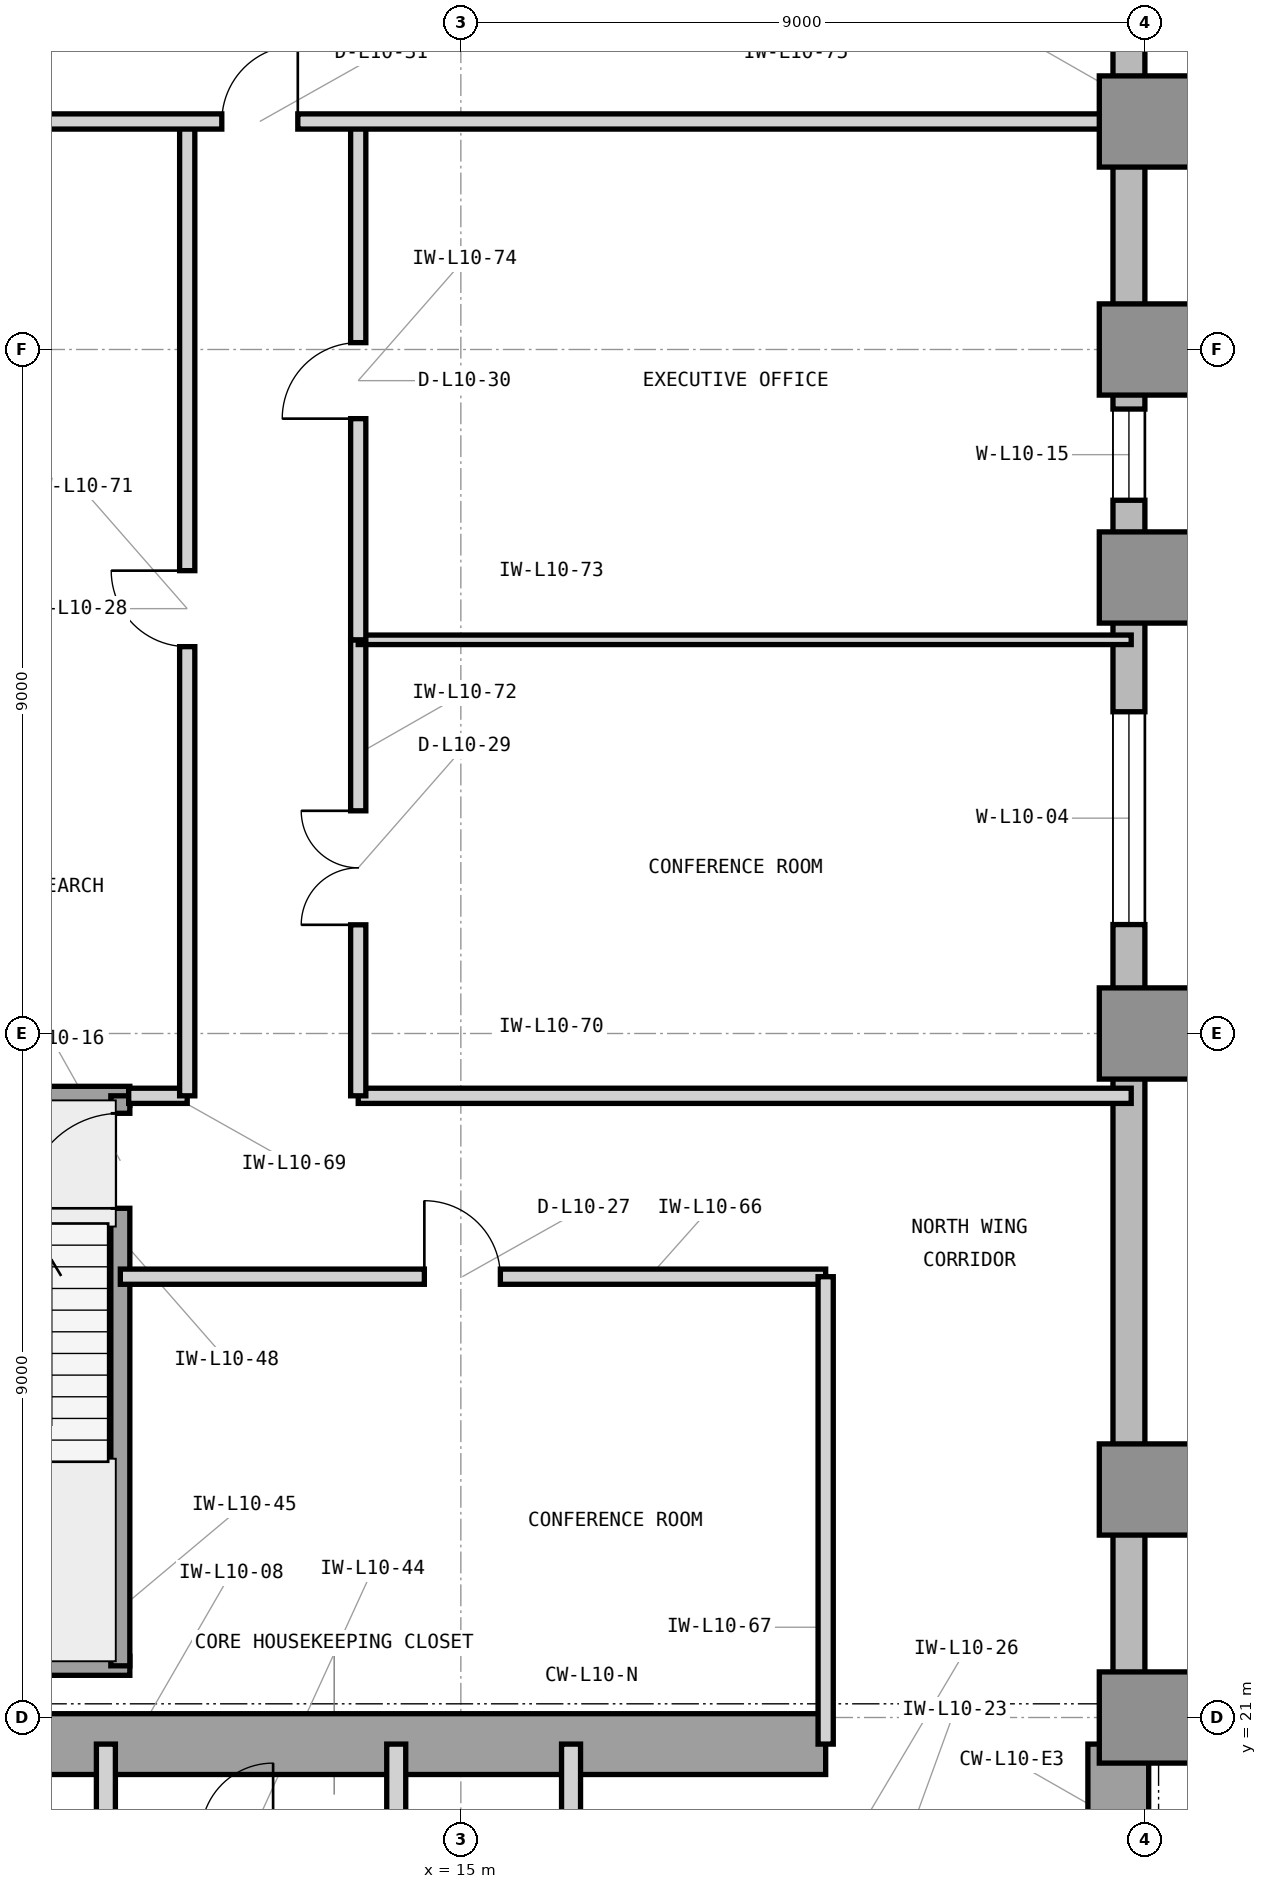
"""IFC4 building model, lengths in metres.
Left out: names, types, materials, properties, quantities, classifications, styles, units other than length and angle.
Written with IfcOpenShell. Run it as: python <this file> out.ifc"""

import sys

from ifc_helpers import new_model, si_unit, direction, frame, frame_2d, origin, origin_2d, place, context, subcontext, project, spatial, rectangle, extrude, element, fill, save


model = new_model("IFC4")
c1 = context("Model", 3, precision=1e-05, world=origin(), true_north=direction((0.0, 1.0)))
c2 = subcontext(c1, "Body", "Model", "MODEL_VIEW")
j1 = project(units=[si_unit("LENGTHUNIT", "METRE"), si_unit("PLANEANGLEUNIT", "RADIAN")], contexts=[c1])
p1 = place(None, origin())
s1 = spatial("IfcSite", under=j1, at=p1, CompositionType="ELEMENT")
p2 = place(p1, origin())
s2 = spatial("IfcBuilding", under=s1, at=p2, CompositionType="ELEMENT")
p3 = place(p2, frame((0.0, 0.0, 46.8)))
s3 = spatial("IfcBuildingStorey", under=s2, at=p3, CompositionType="ELEMENT", Elevation=46.8)
p4 = place(p3, frame((7.475, 20.65, 0.0), z_axis=(0.0, 0.0, 1.0), x_axis=(1.0, 0.0, 0.0)))
e1 = element("IfcWall", 1, at=p4, inside=s3, PredefinedType="SHEAR", context=c2, shape_type="SweptSolid", body=[
    extrude(rectangle(XDim=12.325, YDim=0.8, at=frame_2d((6.163, 0.0))), origin(), (0.0, 0.0, 1.0), 4.2),
])
p5 = place(p3, frame((23.65, 16.6, 0.0), z_axis=(0.0, 0.0, 1.0), x_axis=(0.0, 1.0, 0.0)))
e2 = element("IfcWall", 2, at=p5, inside=s3, PredefinedType="SHEAR", context=c2, shape_type="SweptSolid", body=[
    extrude(rectangle(XDim=4.05, YDim=0.8, at=frame_2d((2.025, 0.0))), origin(), (0.0, 0.0, 1.0), 4.2),
])
for number, where, z_axis, x_axis in (
    (3, (24.0, 21.0, 0.0), (0.0, 0.0, 1.0), (1.0, 0.0, 0.0)),
    (4, (24.0, 24.0, 0.0), (0.0, 0.0, 1.0), (1.0, 0.0, 0.0)),
    (5, (24.0, 30.0, 0.0), (0.0, 0.0, 1.0), (1.0, 0.0, 0.0)),
    (6, (24.0, 36.0, 0.0), (0.0, 0.0, 1.0), (1.0, 0.0, 0.0)),
    (7, (24.0, 39.0, 0.0), (0.0, 0.0, 1.0), (1.0, 0.0, 0.0)),
    (8, (24.0, 42.0, 0.0), (0.0, 0.0, 1.0), (1.0, 0.0, 0.0)),
):
    element("IfcColumn", number, at=place(p3, frame(where, z_axis=z_axis, x_axis=x_axis)), inside=s3, PredefinedType="COLUMN", context=c2, shape_type="SweptSolid", body=[
        extrude(rectangle(XDim=1.2, YDim=1.2, at=origin_2d()), origin(), (0.0, 0.0, 1.0), 4.2),
    ])
p6 = place(p3, frame((64.4, 20.79, 0.0), z_axis=(0.0, 0.0, 1.0), x_axis=(-1.0, 0.0, 0.0)))
e9 = element("IfcWall", 9, at=p6, inside=s3, PredefinedType="STANDARD", context=c2, shape_type="SweptSolid", body=[
    extrude(rectangle(XDim=40.4, YDim=0.42, at=frame_2d((20.2, 0.0))), origin(), (0.0, 0.0, 1.0), 3.98),
])
p7 = place(p6, frame((26.375, 0.0, 0.85)))
e10 = element("IfcOpeningElement", 10, at=p7, cuts=e9, PredefinedType="OPENING", context=c2, shape_type="SweptSolid", body=[
    extrude(rectangle(XDim=2.8, YDim=2.45, at=frame_2d((1.4, 1.225))), frame((0.0, 0.22, 0.0), z_axis=(0.0, -1.0, 0.0), x_axis=(1.0, 0.0, 0.0)), (0.0, 0.0, 1.0), 0.44),
])
p8 = place(p6, frame((38.222, 0.0, 0.85)))
e11 = element("IfcOpeningElement", 11, at=p8, cuts=e9, PredefinedType="OPENING", context=c2, shape_type="SweptSolid", body=[
    extrude(rectangle(XDim=1.2, YDim=2.45, at=frame_2d((0.6, 1.225))), frame((0.0, 0.22, 0.0), z_axis=(0.0, -1.0, 0.0), x_axis=(1.0, 0.0, 0.0)), (0.0, 0.0, 1.0), 0.44),
])
p9 = place(p6, frame((32.536, 0.0, 0.85)))
e12 = element("IfcOpeningElement", 12, at=p9, cuts=e9, PredefinedType="OPENING", context=c2, shape_type="SweptSolid", body=[
    extrude(rectangle(XDim=2.8, YDim=2.45, at=frame_2d((1.4, 1.225))), frame((0.0, 0.22, 0.0), z_axis=(0.0, -1.0, 0.0), x_axis=(1.0, 0.0, 0.0)), (0.0, 0.0, 1.0), 0.44),
])
p10 = place(p6, frame((17.386, 0.0, 0.85)))
e13 = element("IfcOpeningElement", 13, at=p10, cuts=e9, PredefinedType="OPENING", context=c2, shape_type="SweptSolid", body=[
    extrude(rectangle(XDim=2.8, YDim=2.45, at=frame_2d((1.4, 1.225))), frame((0.0, 0.22, 0.0), z_axis=(0.0, -1.0, 0.0), x_axis=(1.0, 0.0, 0.0)), (0.0, 0.0, 1.0), 0.44),
])
p11 = place(p3, frame((23.79, 21.0, 0.0), z_axis=(0.0, 0.0, 1.0), x_axis=(0.0, 1.0, 0.0)))
e14 = element("IfcWall", 14, at=p11, inside=s3, PredefinedType="STANDARD", context=c2, shape_type="SweptSolid", body=[
    extrude(rectangle(XDim=28.4, YDim=0.42, at=frame_2d((14.2, 0.0))), origin(), (0.0, 0.0, 1.0), 3.98),
])
p12 = place(p11, frame((10.433, 0.0, 0.85)))
e15 = element("IfcOpeningElement", 15, at=p12, cuts=e14, PredefinedType="OPENING", context=c2, shape_type="SweptSolid", body=[
    extrude(rectangle(XDim=2.8, YDim=2.45, at=frame_2d((1.4, 1.225))), frame((0.0, 0.22, 0.0), z_axis=(0.0, -1.0, 0.0), x_axis=(1.0, 0.0, 0.0)), (0.0, 0.0, 1.0), 0.44),
])
p13 = place(p11, frame((16.016, 0.0, 0.85)))
e16 = element("IfcOpeningElement", 16, at=p13, cuts=e14, PredefinedType="OPENING", context=c2, shape_type="SweptSolid", body=[
    extrude(rectangle(XDim=1.2, YDim=2.45, at=frame_2d((0.6, 1.225))), frame((0.0, 0.22, 0.0), z_axis=(0.0, -1.0, 0.0), x_axis=(1.0, 0.0, 0.0)), (0.0, 0.0, 1.0), 0.44),
])
p14 = place(p3, frame((10.33, 19.45, 0.0), z_axis=(0.0, 0.0, 1.0), x_axis=(0.0, 1.0, 0.0)))
e17 = element("IfcWall", 17, at=p14, inside=s3, PredefinedType="PARTITIONING", context=c2, shape_type="SweptSolid", body=[
    extrude(rectangle(XDim=1.2, YDim=0.25, at=frame_2d((0.6, 0.0))), origin(), (0.0, 0.0, 1.0), 3.114),
])
for number, where, z_axis, x_axis in (
    (18, (14.15, 16.7, 0.0), (0.0, 0.0, 1.0), (0.0, 1.0, 0.0)),
    (19, (16.45, 16.7, 0.0), (0.0, 0.0, 1.0), (0.0, 1.0, 0.0)),
):
    element("IfcWall", number, at=place(p3, frame(where, z_axis=z_axis, x_axis=x_axis)), inside=s3, PredefinedType="PARTITIONING", context=c2, shape_type="SweptSolid", body=[
        extrude(rectangle(XDim=3.95, YDim=0.25, at=frame_2d((1.975, 0.0))), origin(), (0.0, 0.0, 1.0), 3.97),
    ])
for number, where, z_axis, x_axis in (
    (20, (6.555, 21.68, 0.0), (0.0, 0.0, 1.0), (1.0, 0.0, 0.0)),
    (21, (6.555, 29.18, 0.0), (0.0, 0.0, 1.0), (1.0, 0.0, 0.0)),
):
    element("IfcWall", number, at=place(p3, frame(where, z_axis=z_axis, x_axis=x_axis)), inside=s3, PredefinedType="SHEAR", context=c2, shape_type="SweptSolid", body=[
        extrude(rectangle(XDim=4.09, YDim=0.25, at=frame_2d((2.045, 0.0))), origin(), (0.0, 0.0, 1.0), 4.2),
    ])
p15 = place(p3, frame((10.52, 21.68, 0.0), z_axis=(0.0, 0.0, 1.0), x_axis=(0.0, 1.0, 0.0)))
e22 = element("IfcWall", 22, at=p15, inside=s3, PredefinedType="SHEAR", context=c2, shape_type="SweptSolid", body=[
    extrude(rectangle(XDim=7.5, YDim=0.25, at=frame_2d((3.75, 0.0))), origin(), (0.0, 0.0, 1.0), 4.2),
])
p16 = place(p15, frame((6.02, 0.0, 0.0)))
e23 = element("IfcOpeningElement", 23, at=p16, cuts=e22, PredefinedType="OPENING", context=c2, shape_type="SweptSolid", body=[
    extrude(rectangle(XDim=1.25, YDim=2.2, at=frame_2d((0.625, 1.1))), frame((0.0, 0.135, 0.0), z_axis=(0.0, -1.0, 0.0), x_axis=(1.0, 0.0, 0.0)), (0.0, 0.0, 1.0), 0.27),
])
p17 = place(p3, frame((10.52, 26.8, 0.0), z_axis=(0.0, 0.0, 1.0), x_axis=(1.0, 0.0, 0.0)))
e24 = element("IfcWall", 24, at=p17, inside=s3, PredefinedType="PARTITIONING", context=c2, shape_type="SweptSolid", body=[
    extrude(rectangle(XDim=9.28, YDim=0.2, at=frame_2d((4.64, 0.0))), origin(), (0.0, 0.0, 1.0), 3.97),
])
p18 = place(p17, frame((4.0, 0.0, 0.0)))
e25 = element("IfcOpeningElement", 25, at=p18, cuts=e24, PredefinedType="OPENING", context=c2, shape_type="SweptSolid", body=[
    extrude(rectangle(XDim=1.0, YDim=2.15, at=frame_2d((0.5, 1.075))), frame((0.0, 0.11, 0.0), z_axis=(0.0, -1.0, 0.0), x_axis=(1.0, 0.0, 0.0)), (0.0, 0.0, 1.0), 0.22),
])
p19 = place(p3, frame((19.8, 20.65, 0.0), z_axis=(0.0, 0.0, 1.0), x_axis=(0.0, 1.0, 0.0)))
e26 = element("IfcWall", 26, at=p19, inside=s3, PredefinedType="PARTITIONING", context=c2, shape_type="SweptSolid", body=[
    extrude(rectangle(XDim=6.15, YDim=0.2, at=frame_2d((3.075, 0.0))), origin(), (0.0, 0.0, 1.0), 3.97),
])
p20 = place(p3, frame((10.63, 29.18, 0.0), z_axis=(0.0, 0.0, 1.0), x_axis=(1.0, 0.0, 0.0)))
e27 = element("IfcWall", 27, at=p20, inside=s3, PredefinedType="PARTITIONING", context=c2, shape_type="SweptSolid", body=[
    extrude(rectangle(XDim=0.77, YDim=0.2, at=frame_2d((0.385, 0.0))), origin(), (0.0, 0.0, 1.0), 3.97),
])
p21 = place(p3, frame((13.65, 29.18, 0.0), z_axis=(0.0, 0.0, 1.0), x_axis=(1.0, 0.0, 0.0)))
e28 = element("IfcWall", 28, at=p21, inside=s3, PredefinedType="PARTITIONING", context=c2, shape_type="SweptSolid", body=[
    extrude(rectangle(XDim=10.17, YDim=0.2, at=frame_2d((5.085, 0.0))), origin(), (0.0, 0.0, 1.0), 3.97),
])
p22 = place(p3, frame((11.4, 29.18, 0.0), z_axis=(0.0, 0.0, 1.0), x_axis=(0.0, 1.0, 0.0)))
e29 = element("IfcWall", 29, at=p22, inside=s3, PredefinedType="PARTITIONING", context=c2, shape_type="SweptSolid", body=[
    extrude(rectangle(XDim=12.82, YDim=0.2, at=frame_2d((6.41, 0.0))), origin(), (0.0, 0.0, 1.0), 3.97),
])
p23 = place(p22, frame((5.91, 0.0, 0.0)))
e30 = element("IfcOpeningElement", 30, at=p23, cuts=e29, PredefinedType="OPENING", context=c2, shape_type="SweptSolid", body=[
    extrude(rectangle(XDim=1.0, YDim=2.15, at=frame_2d((0.5, 1.075))), frame((0.0, 0.11, 0.0), z_axis=(0.0, -1.0, 0.0), x_axis=(1.0, 0.0, 0.0)), (0.0, 0.0, 1.0), 0.22),
])
p24 = place(p3, frame((13.65, 29.18, 0.0), z_axis=(0.0, 0.0, 1.0), x_axis=(0.0, 1.0, 0.0)))
e31 = element("IfcWall", 31, at=p24, inside=s3, PredefinedType="PARTITIONING", context=c2, shape_type="SweptSolid", body=[
    extrude(rectangle(XDim=6.0, YDim=0.2, at=frame_2d((3.0, 0.0))), origin(), (0.0, 0.0, 1.0), 3.97),
])
p25 = place(p24, frame((2.25, 0.0, 0.0)))
e32 = element("IfcOpeningElement", 32, at=p25, cuts=e31, PredefinedType="OPENING", context=c2, shape_type="SweptSolid", body=[
    extrude(rectangle(XDim=1.5, YDim=2.3, at=frame_2d((0.75, 1.15))), frame((0.0, 0.11, 0.0), z_axis=(0.0, -1.0, 0.0), x_axis=(1.0, 0.0, 0.0)), (0.0, 0.0, 1.0), 0.22),
])
p26 = place(p3, frame((13.65, 35.18, 0.0), z_axis=(0.0, 0.0, 1.0), x_axis=(1.0, 0.0, 0.0)))
e33 = element("IfcWall", 33, at=p26, inside=s3, PredefinedType="PARTITIONING", context=c2, shape_type="SweptSolid", body=[
    extrude(rectangle(XDim=10.17, YDim=0.125, at=frame_2d((5.085, 0.0))), origin(), (0.0, 0.0, 1.0), 3.97),
])
p27 = place(p3, frame((13.65, 35.18, 0.0), z_axis=(0.0, 0.0, 1.0), x_axis=(0.0, 1.0, 0.0)))
e34 = element("IfcWall", 34, at=p27, inside=s3, PredefinedType="PARTITIONING", context=c2, shape_type="SweptSolid", body=[
    extrude(rectangle(XDim=6.82, YDim=0.2, at=frame_2d((3.41, 0.0))), origin(), (0.0, 0.0, 1.0), 3.97),
])
p28 = place(p27, frame((2.91, 0.0, 0.0)))
e35 = element("IfcOpeningElement", 35, at=p28, cuts=e34, PredefinedType="OPENING", context=c2, shape_type="SweptSolid", body=[
    extrude(rectangle(XDim=1.0, YDim=2.15, at=frame_2d((0.5, 1.075))), frame((0.0, 0.11, 0.0), z_axis=(0.0, -1.0, 0.0), x_axis=(1.0, 0.0, 0.0)), (0.0, 0.0, 1.0), 0.22),
])
p29 = place(p3, frame((6.18, 42.0, 0.0), z_axis=(0.0, 0.0, 1.0), x_axis=(1.0, 0.0, 0.0)))
e36 = element("IfcWall", 36, at=p29, inside=s3, PredefinedType="PARTITIONING", context=c2, shape_type="SweptSolid", body=[
    extrude(rectangle(XDim=17.64, YDim=0.2, at=frame_2d((8.82, 0.0))), origin(), (0.0, 0.0, 1.0), 3.114),
])
p30 = place(p29, frame((5.675, 0.0, 0.0)))
e37 = element("IfcOpeningElement", 37, at=p30, cuts=e36, PredefinedType="OPENING", context=c2, shape_type="SweptSolid", body=[
    extrude(rectangle(XDim=1.0, YDim=2.15, at=frame_2d((0.5, 1.075))), frame((0.0, 0.11, 0.0), z_axis=(0.0, -1.0, 0.0), x_axis=(1.0, 0.0, 0.0)), (0.0, 0.0, 1.0), 0.22),
])
p31 = place(p12, origin())
e38 = element("IfcWindow", 38, at=p31, inside=s3, PartitioningType="SINGLE_PANEL", PredefinedType="WINDOW", context=c2, shape_type="SweptSolid", body=[
    extrude(rectangle(XDim=2.8, YDim=2.45, at=frame_2d((1.4, 1.225))), frame((0.0, 0.11, 0.0), z_axis=(0.0, -1.0, 0.0), x_axis=(1.0, 0.0, 0.0)), (0.0, 0.0, 1.0), 0.06),
])
fill(e15, e38)
p32 = place(p16, origin())
e39 = element("IfcDoor", 39, at=p32, inside=s3, OperationType="SINGLE_SWING_LEFT", PredefinedType="DOOR", context=c2, shape_type="SweptSolid", body=[
    extrude(rectangle(XDim=1.25, YDim=2.2, at=frame_2d((0.625, 1.1))), frame((0.0, 0.025, 0.0), z_axis=(0.0, -1.0, 0.0), x_axis=(1.0, 0.0, 0.0)), (0.0, 0.0, 1.0), 0.05),
])
fill(e23, e39)
p33 = place(p18, origin())
e40 = element("IfcDoor", 40, at=p33, inside=s3, OperationType="SINGLE_SWING_LEFT", PredefinedType="DOOR", context=c2, shape_type="SweptSolid", body=[
    extrude(rectangle(XDim=1.0, YDim=2.15, at=frame_2d((0.5, 1.075))), frame((0.0, 0.025, 0.0), z_axis=(0.0, -1.0, 0.0), x_axis=(1.0, 0.0, 0.0)), (0.0, 0.0, 1.0), 0.05),
])
fill(e25, e40)
p34 = place(p23, origin())
e41 = element("IfcDoor", 41, at=p34, inside=s3, OperationType="SINGLE_SWING_RIGHT", PredefinedType="DOOR", context=c2, shape_type="SweptSolid", body=[
    extrude(rectangle(XDim=1.0, YDim=2.15, at=frame_2d((0.5, 1.075))), frame((0.0, 0.025, 0.0), z_axis=(0.0, -1.0, 0.0), x_axis=(1.0, 0.0, 0.0)), (0.0, 0.0, 1.0), 0.05),
])
fill(e30, e41)
p35 = place(p25, origin())
e42 = element("IfcDoor", 42, at=p35, inside=s3, OperationType="DOUBLE_DOOR_SINGLE_SWING", PredefinedType="DOOR", context=c2, shape_type="SweptSolid", body=[
    extrude(rectangle(XDim=1.5, YDim=2.3, at=frame_2d((0.75, 1.15))), frame((0.0, 0.025, 0.0), z_axis=(0.0, -1.0, 0.0), x_axis=(1.0, 0.0, 0.0)), (0.0, 0.0, 1.0), 0.05),
])
fill(e32, e42)
p36 = place(p28, origin())
e43 = element("IfcDoor", 43, at=p36, inside=s3, OperationType="SINGLE_SWING_LEFT", PredefinedType="DOOR", context=c2, shape_type="SweptSolid", body=[
    extrude(rectangle(XDim=1.0, YDim=2.15, at=frame_2d((0.5, 1.075))), frame((0.0, 0.025, 0.0), z_axis=(0.0, -1.0, 0.0), x_axis=(1.0, 0.0, 0.0)), (0.0, 0.0, 1.0), 0.05),
])
fill(e35, e43)
p37 = place(p30, origin())
e44 = element("IfcDoor", 44, at=p37, inside=s3, OperationType="SINGLE_SWING_RIGHT", PredefinedType="DOOR", context=c2, shape_type="SweptSolid", body=[
    extrude(rectangle(XDim=1.0, YDim=2.15, at=frame_2d((0.5, 1.075))), frame((0.0, 0.025, 0.0), z_axis=(0.0, -1.0, 0.0), x_axis=(1.0, 0.0, 0.0)), (0.0, 0.0, 1.0), 0.05),
])
fill(e37, e44)
p38 = place(p13, origin())
e45 = element("IfcWindow", 45, at=p38, inside=s3, PartitioningType="SINGLE_PANEL", PredefinedType="WINDOW", context=c2, shape_type="SweptSolid", body=[
    extrude(rectangle(XDim=1.2, YDim=2.45, at=frame_2d((0.6, 1.225))), frame((0.0, 0.11, 0.0), z_axis=(0.0, -1.0, 0.0), x_axis=(1.0, 0.0, 0.0)), (0.0, 0.0, 1.0), 0.06),
])
fill(e16, e45)
save(model, sys.argv[1])
